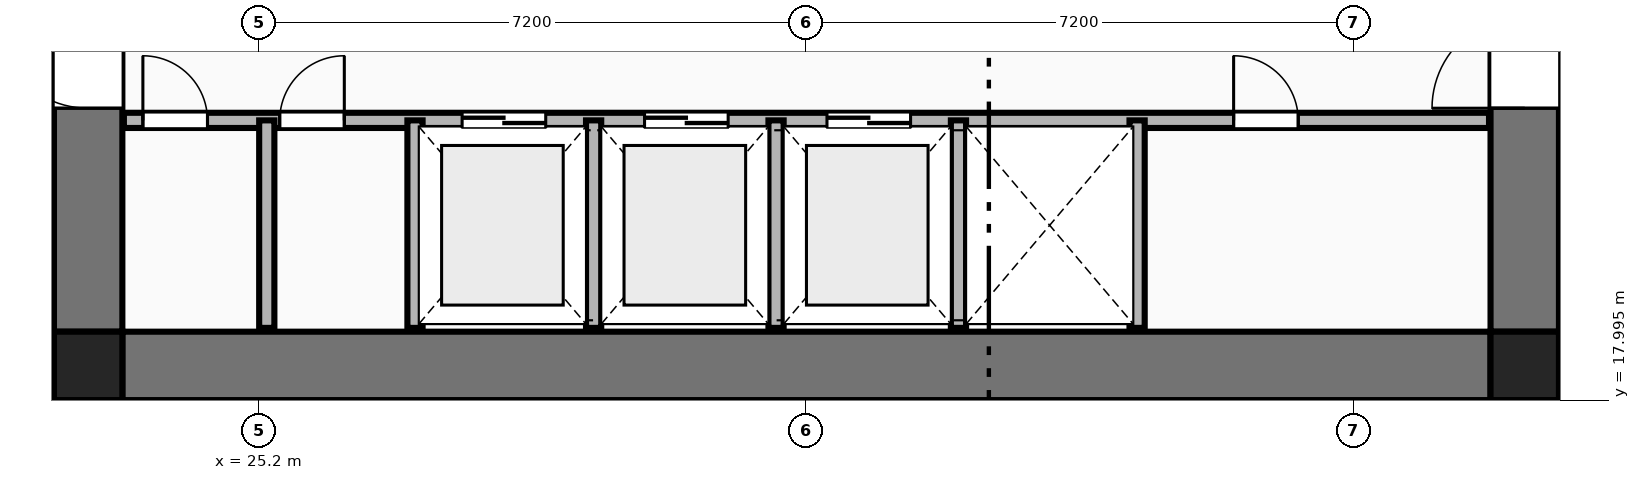
"""IFC4 building model, lengths in metres.
Left out: names, types, materials, properties, quantities, classifications, styles, units other than length and angle.
Written with IfcOpenShell. Run it as: python <this file> out.ifc"""

import sys

from ifc_helpers import new_model, si_unit, direction, frame, frame_2d, origin, origin_2d, place, context, subcontext, project, spatial, rectangle, extrude, element, fill, save


model = new_model("IFC4")
c1 = context("Model", 3, precision=1e-05, world=origin(), true_north=direction((0.0, 1.0)))
c2 = subcontext(c1, "Body", "Model", "MODEL_VIEW")
j1 = project(units=[si_unit("LENGTHUNIT", "METRE"), si_unit("PLANEANGLEUNIT", "RADIAN")], contexts=[c1])
p1 = place(None, origin())
s1 = spatial("IfcSite", under=j1, at=p1, CompositionType="ELEMENT")
p2 = place(p1, origin())
s2 = spatial("IfcBuilding", under=s1, at=p2, CompositionType="ELEMENT")
p3 = place(p2, frame((0.0, 0.0, 35.55)))
s3 = spatial("IfcBuildingStorey", under=s2, at=p3, CompositionType="ELEMENT", Elevation=35.55)
for number, where, z_axis, x_axis in (
    (1, (22.95, 18.45, 0.0), (0.0, 0.0, 1.0), (1.0, 0.0, 0.0)),
    (2, (41.85, 18.45, 0.0), (0.0, 0.0, 1.0), (1.0, 0.0, 0.0)),
):
    element("IfcColumn", number, at=place(p3, frame(where, z_axis=z_axis, x_axis=x_axis)), inside=s3, PredefinedType="COLUMN", context=c2, shape_type="SweptSolid", body=[
        extrude(rectangle(XDim=0.9, YDim=0.9, at=origin_2d()), origin(), (0.0, 0.0, 1.0), 3.55),
    ])
p4 = place(p3, frame((23.4, 18.45, 0.0), z_axis=(0.0, 0.0, 1.0), x_axis=(1.0, 0.0, 0.0)))
e3 = element("IfcWall", 3, at=p4, inside=s3, PredefinedType="SHEAR", context=c2, shape_type="SweptSolid", body=[
    extrude(rectangle(XDim=18.0, YDim=0.9, at=frame_2d((9.0, 0.0))), origin(), (0.0, 0.0, 1.0), 3.33),
])
p5 = place(p3, frame((22.95, 18.9, 0.0), z_axis=(0.0, 0.0, 1.0), x_axis=(0.0, 1.0, 0.0)))
e4 = element("IfcWall", 4, at=p5, inside=s3, PredefinedType="SHEAR", context=c2, shape_type="SweptSolid", body=[
    extrude(rectangle(XDim=14.0, YDim=0.9, at=frame_2d((7.0, 0.0))), origin(), (0.0, 0.0, 1.0), 3.33),
])
p6 = place(p5, frame((2.94, 0.0, 0.0)))
e5 = element("IfcOpeningElement", 5, at=p6, cuts=e4, PredefinedType="OPENING", context=c2, shape_type="SweptSolid", body=[
    extrude(rectangle(XDim=1.22, YDim=2.25, at=frame_2d((0.61, 1.125))), frame((0.0, 0.46, 0.0), z_axis=(0.0, -1.0, 0.0), x_axis=(1.0, 0.0, 0.0)), (0.0, 0.0, 1.0), 0.92),
])
p7 = place(p3, frame((41.85, 18.9, 0.0), z_axis=(0.0, 0.0, 1.0), x_axis=(0.0, 1.0, 0.0)))
e6 = element("IfcWall", 6, at=p7, inside=s3, PredefinedType="SHEAR", context=c2, shape_type="SweptSolid", body=[
    extrude(rectangle(XDim=14.0, YDim=0.9, at=frame_2d((7.0, 0.0))), origin(), (0.0, 0.0, 1.0), 3.33),
])
p8 = place(p7, frame((2.94, 0.0, 0.0)))
e7 = element("IfcOpeningElement", 7, at=p8, cuts=e6, PredefinedType="OPENING", context=c2, shape_type="SweptSolid", body=[
    extrude(rectangle(XDim=1.22, YDim=2.25, at=frame_2d((0.61, 1.125))), frame((0.0, 0.46, 0.0), z_axis=(0.0, -1.0, 0.0), x_axis=(1.0, 0.0, 0.0)), (0.0, 0.0, 1.0), 0.92),
])
p9 = place(p3, frame((23.42, 21.68, 0.0), z_axis=(0.0, 0.0, 1.0), x_axis=(1.0, 0.0, 0.0)))
e8 = element("IfcWall", 8, at=p9, inside=s3, PredefinedType="PLUMBINGWALL", context=c2, shape_type="SweptSolid", body=[
    extrude(rectangle(XDim=17.96, YDim=0.2, at=frame_2d((8.98, 0.0))), origin(), (0.0, 0.0, 1.0), 3.33),
])
p10 = place(p9, frame((4.45, 0.0, 0.0)))
e9 = element("IfcOpeningElement", 9, at=p10, cuts=e8, PredefinedType="OPENING", context=c2, shape_type="SweptSolid", body=[
    extrude(rectangle(XDim=1.1, YDim=2.2, at=frame_2d((0.55, 1.1))), frame((0.0, 0.11, 0.0), z_axis=(0.0, -1.0, 0.0), x_axis=(1.0, 0.0, 0.0)), (0.0, 0.0, 1.0), 0.22),
])
p11 = place(p9, frame((6.85, 0.0, 0.0)))
e10 = element("IfcOpeningElement", 10, at=p11, cuts=e8, PredefinedType="OPENING", context=c2, shape_type="SweptSolid", body=[
    extrude(rectangle(XDim=1.1, YDim=2.2, at=frame_2d((0.55, 1.1))), frame((0.0, 0.11, 0.0), z_axis=(0.0, -1.0, 0.0), x_axis=(1.0, 0.0, 0.0)), (0.0, 0.0, 1.0), 0.22),
])
p12 = place(p9, frame((9.25, 0.0, 0.0)))
e11 = element("IfcOpeningElement", 11, at=p12, cuts=e8, PredefinedType="OPENING", context=c2, shape_type="SweptSolid", body=[
    extrude(rectangle(XDim=1.1, YDim=2.2, at=frame_2d((0.55, 1.1))), frame((0.0, 0.11, 0.0), z_axis=(0.0, -1.0, 0.0), x_axis=(1.0, 0.0, 0.0)), (0.0, 0.0, 1.0), 0.22),
])
p13 = place(p9, frame((0.25, 0.0, 0.0)))
e12 = element("IfcOpeningElement", 12, at=p13, cuts=e8, PredefinedType="OPENING", context=c2, shape_type="SweptSolid", body=[
    extrude(rectangle(XDim=0.85, YDim=2.05, at=frame_2d((0.425, 1.025))), frame((0.0, 0.11, 0.0), z_axis=(0.0, -1.0, 0.0), x_axis=(1.0, 0.0, 0.0)), (0.0, 0.0, 1.0), 0.22),
])
p14 = place(p9, frame((2.05, 0.0, 0.0)))
e13 = element("IfcOpeningElement", 13, at=p14, cuts=e8, PredefinedType="OPENING", context=c2, shape_type="SweptSolid", body=[
    extrude(rectangle(XDim=0.85, YDim=2.05, at=frame_2d((0.425, 1.025))), frame((0.0, 0.11, 0.0), z_axis=(0.0, -1.0, 0.0), x_axis=(1.0, 0.0, 0.0)), (0.0, 0.0, 1.0), 0.22),
])
p15 = place(p9, frame((14.6, 0.0, 0.0)))
e14 = element("IfcOpeningElement", 14, at=p15, cuts=e8, PredefinedType="OPENING", context=c2, shape_type="SweptSolid", body=[
    extrude(rectangle(XDim=0.85, YDim=2.05, at=frame_2d((0.425, 1.025))), frame((0.0, 0.11, 0.0), z_axis=(0.0, -1.0, 0.0), x_axis=(1.0, 0.0, 0.0)), (0.0, 0.0, 1.0), 0.22),
])
for number, where, z_axis, x_axis in (
    (15, (27.25, 18.95, 0.0), (0.0, 0.0, 1.0), (0.0, 1.0, 0.0)),
    (16, (29.6, 18.95, 0.0), (0.0, 0.0, 1.0), (0.0, 1.0, 0.0)),
    (17, (32.0, 18.95, 0.0), (0.0, 0.0, 1.0), (0.0, 1.0, 0.0)),
    (18, (34.4, 18.95, 0.0), (0.0, 0.0, 1.0), (0.0, 1.0, 0.0)),
    (19, (36.75, 18.95, 0.0), (0.0, 0.0, 1.0), (0.0, 1.0, 0.0)),
    (20, (25.3, 18.95, 0.0), (0.0, 0.0, 1.0), (0.0, 1.0, 0.0)),
):
    element("IfcWall", number, at=place(p3, frame(where, z_axis=z_axis, x_axis=x_axis)), inside=s3, PredefinedType="PLUMBINGWALL", context=c2, shape_type="SweptSolid", body=[
        extrude(rectangle(XDim=2.73, YDim=0.2, at=frame_2d((1.365, 0.0))), origin(), (0.0, 0.0, 1.0), 3.33),
    ])
p16 = place(p6, origin())
e21 = element("IfcDoor", 21, at=p16, inside=s3, OperationType="SINGLE_SWING_RIGHT", PredefinedType="DOOR", context=c2, shape_type="SweptSolid", body=[
    extrude(rectangle(XDim=1.22, YDim=2.25, at=frame_2d((0.61, 1.125))), frame((0.0, 0.025, 0.0), z_axis=(0.0, -1.0, 0.0), x_axis=(1.0, 0.0, 0.0)), (0.0, 0.0, 1.0), 0.05),
])
fill(e5, e21)
p17 = place(p8, origin())
e22 = element("IfcDoor", 22, at=p17, inside=s3, OperationType="SINGLE_SWING_LEFT", PredefinedType="DOOR", context=c2, shape_type="SweptSolid", body=[
    extrude(rectangle(XDim=1.22, YDim=2.25, at=frame_2d((0.61, 1.125))), frame((0.0, 0.025, 0.0), z_axis=(0.0, -1.0, 0.0), x_axis=(1.0, 0.0, 0.0)), (0.0, 0.0, 1.0), 0.05),
])
fill(e7, e22)
p18 = place(p10, origin())
e23 = element("IfcDoor", 23, at=p18, inside=s3, OperationType="DOUBLE_DOOR_SLIDING", PredefinedType="DOOR", context=c2, shape_type="SweptSolid", body=[
    extrude(rectangle(XDim=1.1, YDim=2.2, at=frame_2d((0.55, 1.1))), frame((0.0, 0.025, 0.0), z_axis=(0.0, -1.0, 0.0), x_axis=(1.0, 0.0, 0.0)), (0.0, 0.0, 1.0), 0.05),
])
fill(e9, e23)
p19 = place(p11, origin())
e24 = element("IfcDoor", 24, at=p19, inside=s3, OperationType="DOUBLE_DOOR_SLIDING", PredefinedType="DOOR", context=c2, shape_type="SweptSolid", body=[
    extrude(rectangle(XDim=1.1, YDim=2.2, at=frame_2d((0.55, 1.1))), frame((0.0, 0.025, 0.0), z_axis=(0.0, -1.0, 0.0), x_axis=(1.0, 0.0, 0.0)), (0.0, 0.0, 1.0), 0.05),
])
fill(e10, e24)
p20 = place(p12, origin())
e25 = element("IfcDoor", 25, at=p20, inside=s3, OperationType="DOUBLE_DOOR_SLIDING", PredefinedType="DOOR", context=c2, shape_type="SweptSolid", body=[
    extrude(rectangle(XDim=1.1, YDim=2.2, at=frame_2d((0.55, 1.1))), frame((0.0, 0.025, 0.0), z_axis=(0.0, -1.0, 0.0), x_axis=(1.0, 0.0, 0.0)), (0.0, 0.0, 1.0), 0.05),
])
fill(e11, e25)
p21 = place(p13, origin())
e26 = element("IfcDoor", 26, at=p21, inside=s3, OperationType="SINGLE_SWING_LEFT", PredefinedType="DOOR", context=c2, shape_type="SweptSolid", body=[
    extrude(rectangle(XDim=0.85, YDim=2.05, at=frame_2d((0.425, 1.025))), frame((0.0, 0.025, 0.0), z_axis=(0.0, -1.0, 0.0), x_axis=(1.0, 0.0, 0.0)), (0.0, 0.0, 1.0), 0.05),
])
fill(e12, e26)
p22 = place(p14, origin())
e27 = element("IfcDoor", 27, at=p22, inside=s3, OperationType="SINGLE_SWING_RIGHT", PredefinedType="DOOR", context=c2, shape_type="SweptSolid", body=[
    extrude(rectangle(XDim=0.85, YDim=2.05, at=frame_2d((0.425, 1.025))), frame((0.0, 0.025, 0.0), z_axis=(0.0, -1.0, 0.0), x_axis=(1.0, 0.0, 0.0)), (0.0, 0.0, 1.0), 0.05),
])
fill(e13, e27)
p23 = place(p15, origin())
e28 = element("IfcDoor", 28, at=p23, inside=s3, OperationType="SINGLE_SWING_LEFT", PredefinedType="DOOR", context=c2, shape_type="SweptSolid", body=[
    extrude(rectangle(XDim=0.85, YDim=2.05, at=frame_2d((0.425, 1.025))), frame((0.0, 0.025, 0.0), z_axis=(0.0, -1.0, 0.0), x_axis=(1.0, 0.0, 0.0)), (0.0, 0.0, 1.0), 0.05),
])
fill(e14, e28)
save(model, sys.argv[1])
